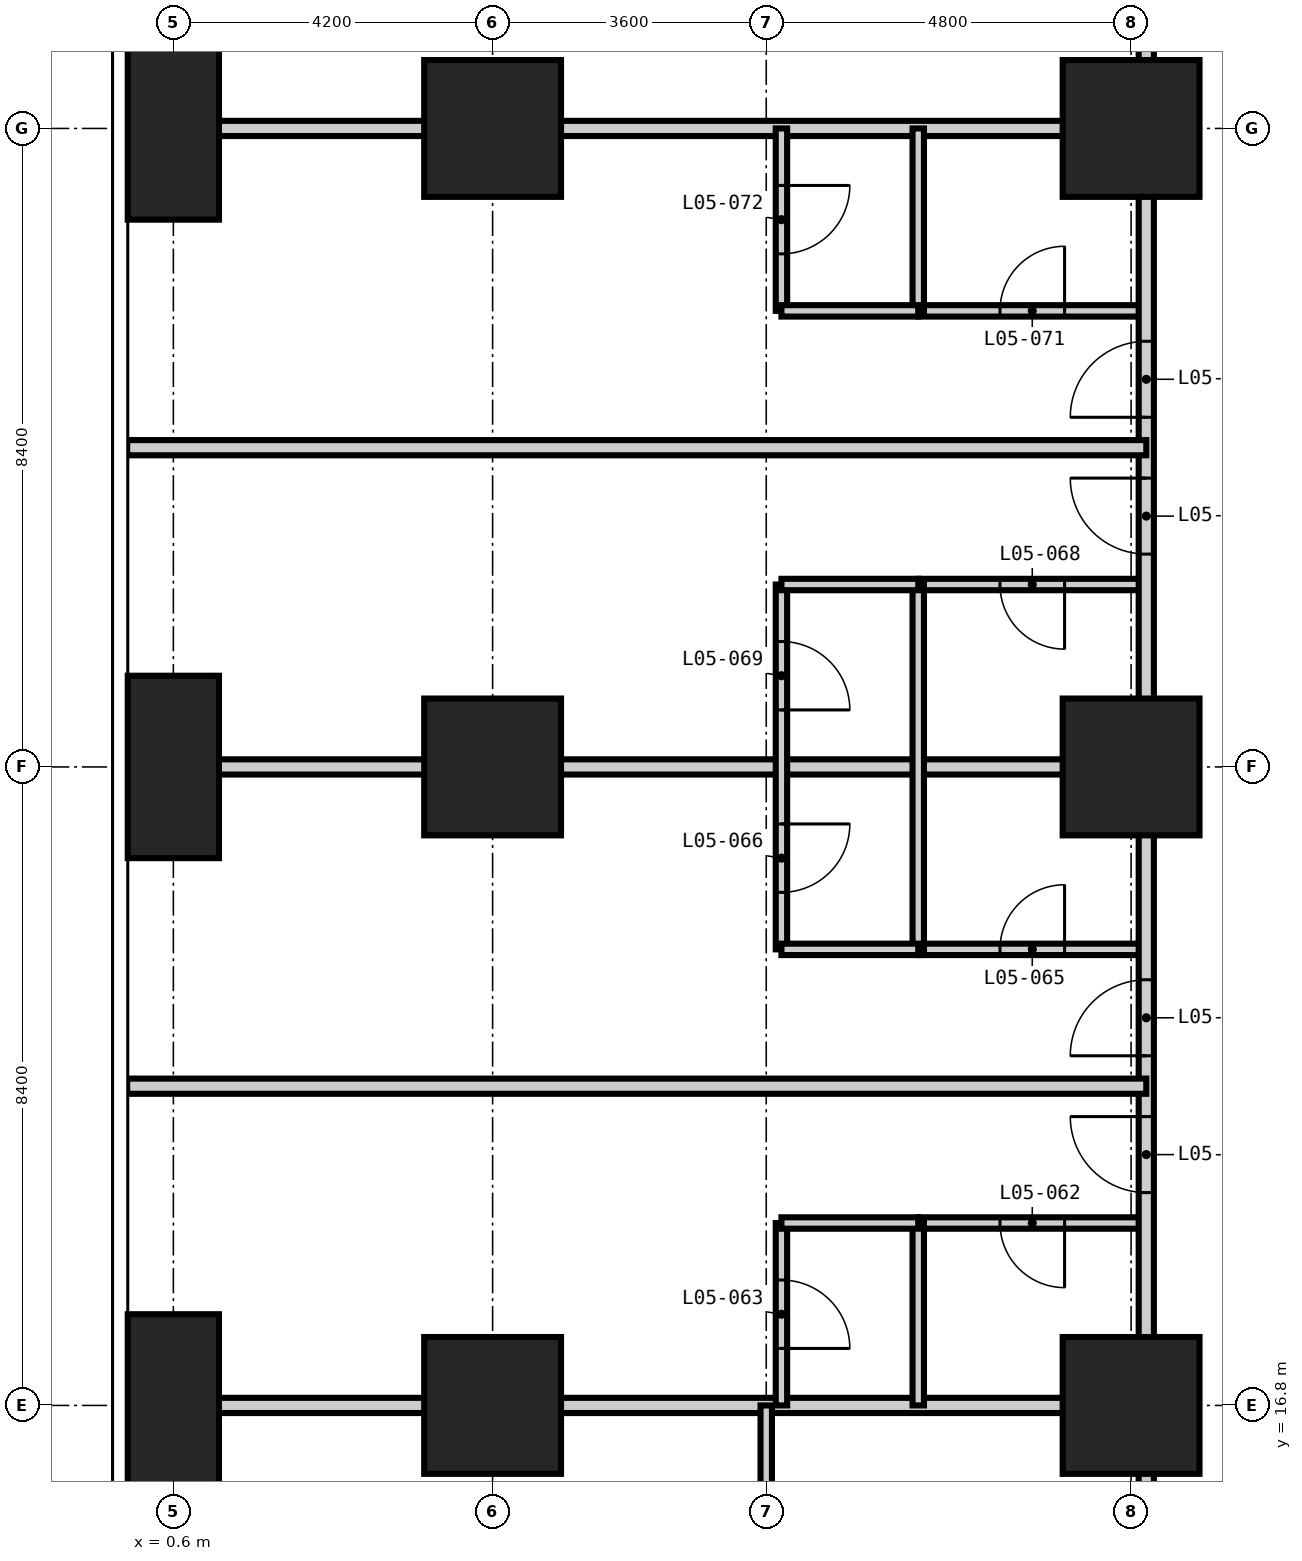
"""IFC4 building model, lengths in metres.
Left out: names, types, materials, properties, quantities, classifications, styles, units other than length and angle.
Written with IfcOpenShell. Run it as: python <this file> out.ifc"""

import sys

from ifc_helpers import new_model, si_unit, direction, frame, frame_2d, origin, origin_2d, place, context, subcontext, project, spatial, rectangle, extrude, element, fill, save


model = new_model("IFC4")
c1 = context("Model", 3, precision=1e-05, world=origin(), true_north=direction((0.0, 1.0)))
c2 = subcontext(c1, "Body", "Model", "MODEL_VIEW")
j1 = project(units=[si_unit("LENGTHUNIT", "METRE"), si_unit("PLANEANGLEUNIT", "RADIAN")], contexts=[c1])
p1 = place(None, origin())
s1 = spatial("IfcSite", under=j1, at=p1, CompositionType="ELEMENT")
p2 = place(p1, origin())
s2 = spatial("IfcBuilding", under=s1, at=p2, CompositionType="ELEMENT")
p3 = place(p2, frame((0.0, 0.0, 27.0)))
s3 = spatial("IfcBuildingStorey", under=s2, at=p3, CompositionType="ELEMENT", Elevation=27.0)
for number, where, z_axis, x_axis in (
    (1, (0.6, 16.8, -0.35), (0.0, 0.0, 1.0), (1.0, 0.0, 0.0)),
    (2, (0.6, 25.2, -0.35), (0.0, 0.0, 1.0), (1.0, 0.0, 0.0)),
    (3, (0.6, 33.6, -0.35), (0.0, 0.0, 1.0), (1.0, 0.0, 0.0)),
):
    element("IfcColumn", number, at=place(p3, frame(where, z_axis=z_axis, x_axis=x_axis)), inside=s3, PredefinedType="COLUMN", context=c2, shape_type="SweptSolid", body=[
        extrude(rectangle(XDim=1.2, YDim=2.4, at=origin_2d()), origin(), (0.0, 0.0, 1.0), 3.6),
    ])
for number, where, z_axis, x_axis in (
    (4, (4.8, 16.8, -0.35), (0.0, 0.0, 1.0), (1.0, 0.0, 0.0)),
    (5, (4.8, 25.2, -0.35), (0.0, 0.0, 1.0), (1.0, 0.0, 0.0)),
    (6, (4.8, 33.6, -0.35), (0.0, 0.0, 1.0), (1.0, 0.0, 0.0)),
    (7, (13.2, 16.8, -0.35), (0.0, 0.0, 1.0), (1.0, 0.0, 0.0)),
    (8, (13.2, 25.2, -0.35), (0.0, 0.0, 1.0), (1.0, 0.0, 0.0)),
    (9, (13.2, 33.6, -0.35), (0.0, 0.0, 1.0), (1.0, 0.0, 0.0)),
):
    element("IfcColumn", number, at=place(p3, frame(where, z_axis=z_axis, x_axis=x_axis)), inside=s3, PredefinedType="COLUMN", context=c2, shape_type="SweptSolid", body=[
        extrude(rectangle(XDim=1.8, YDim=1.8, at=origin_2d()), origin(), (0.0, 0.0, 1.0), 3.6),
    ])
p4 = place(p3, frame((10.4, 19.2, 0.0), z_axis=(0.0, 0.0, 1.0), x_axis=(1.0, 0.0, 0.0)))
e10 = element("IfcWall", 10, at=p4, inside=s3, PredefinedType="PARTITIONING", context=c2, shape_type="SweptSolid", body=[
    extrude(rectangle(XDim=3.0, YDim=0.15, at=frame_2d((1.5, 0.0))), origin(), (0.0, 0.0, 1.0), 3.25),
])
p5 = place(p4, frame((1.075, 0.0, 0.0)))
e11 = element("IfcOpeningElement", 11, at=p5, cuts=e10, PredefinedType="OPENING", context=c2, shape_type="SweptSolid", body=[
    extrude(rectangle(XDim=0.85, YDim=2.1, at=frame_2d((0.425, 1.05))), frame((0.0, 0.085, 0.0), z_axis=(0.0, -1.0, 0.0), x_axis=(1.0, 0.0, 0.0)), (0.0, 0.0, 1.0), 0.17),
])
p6 = place(p3, frame((10.4, 22.8, 0.0), z_axis=(0.0, 0.0, 1.0), x_axis=(1.0, 0.0, 0.0)))
e12 = element("IfcWall", 12, at=p6, inside=s3, PredefinedType="PARTITIONING", context=c2, shape_type="SweptSolid", body=[
    extrude(rectangle(XDim=3.0, YDim=0.15, at=frame_2d((1.5, 0.0))), origin(), (0.0, 0.0, 1.0), 3.25),
])
p7 = place(p6, frame((1.075, 0.0, 0.0)))
e13 = element("IfcOpeningElement", 13, at=p7, cuts=e12, PredefinedType="OPENING", context=c2, shape_type="SweptSolid", body=[
    extrude(rectangle(XDim=0.85, YDim=2.1, at=frame_2d((0.425, 1.05))), frame((0.0, 0.085, 0.0), z_axis=(0.0, -1.0, 0.0), x_axis=(1.0, 0.0, 0.0)), (0.0, 0.0, 1.0), 0.17),
])
p8 = place(p3, frame((10.4, 27.6, 0.0), z_axis=(0.0, 0.0, 1.0), x_axis=(1.0, 0.0, 0.0)))
e14 = element("IfcWall", 14, at=p8, inside=s3, PredefinedType="PARTITIONING", context=c2, shape_type="SweptSolid", body=[
    extrude(rectangle(XDim=3.0, YDim=0.15, at=frame_2d((1.5, 0.0))), origin(), (0.0, 0.0, 1.0), 3.25),
])
p9 = place(p8, frame((1.075, 0.0, 0.0)))
e15 = element("IfcOpeningElement", 15, at=p9, cuts=e14, PredefinedType="OPENING", context=c2, shape_type="SweptSolid", body=[
    extrude(rectangle(XDim=0.85, YDim=2.1, at=frame_2d((0.425, 1.05))), frame((0.0, 0.085, 0.0), z_axis=(0.0, -1.0, 0.0), x_axis=(1.0, 0.0, 0.0)), (0.0, 0.0, 1.0), 0.17),
])
p10 = place(p3, frame((10.4, 31.2, 0.0), z_axis=(0.0, 0.0, 1.0), x_axis=(1.0, 0.0, 0.0)))
e16 = element("IfcWall", 16, at=p10, inside=s3, PredefinedType="PARTITIONING", context=c2, shape_type="SweptSolid", body=[
    extrude(rectangle(XDim=3.0, YDim=0.15, at=frame_2d((1.5, 0.0))), origin(), (0.0, 0.0, 1.0), 3.25),
])
p11 = place(p10, frame((1.075, 0.0, 0.0)))
e17 = element("IfcOpeningElement", 17, at=p11, cuts=e16, PredefinedType="OPENING", context=c2, shape_type="SweptSolid", body=[
    extrude(rectangle(XDim=0.85, YDim=2.1, at=frame_2d((0.425, 1.05))), frame((0.0, 0.085, 0.0), z_axis=(0.0, -1.0, 0.0), x_axis=(1.0, 0.0, 0.0)), (0.0, 0.0, 1.0), 0.17),
])
p12 = place(p3, frame((13.4, 13.4, 0.0), z_axis=(0.0, 0.0, 1.0), x_axis=(0.0, 1.0, 0.0)))
e18 = element("IfcWall", 18, at=p12, inside=s3, PredefinedType="PARTITIONING", context=c2, shape_type="SweptSolid", body=[
    extrude(rectangle(XDim=20.2, YDim=0.2, at=frame_2d((10.1, 0.0))), origin(), (0.0, 0.0, 1.0), 3.25),
])
p13 = place(p12, frame((6.2, 0.0, 0.0)))
e19 = element("IfcOpeningElement", 19, at=p13, cuts=e18, PredefinedType="OPENING", context=c2, shape_type="SweptSolid", body=[
    extrude(rectangle(XDim=1.0, YDim=2.2, at=frame_2d((0.5, 1.1))), frame((0.0, 0.11, 0.0), z_axis=(0.0, -1.0, 0.0), x_axis=(1.0, 0.0, 0.0)), (0.0, 0.0, 1.0), 0.22),
])
p14 = place(p12, frame((8.0, 0.0, 0.0)))
e20 = element("IfcOpeningElement", 20, at=p14, cuts=e18, PredefinedType="OPENING", context=c2, shape_type="SweptSolid", body=[
    extrude(rectangle(XDim=1.0, YDim=2.2, at=frame_2d((0.5, 1.1))), frame((0.0, 0.11, 0.0), z_axis=(0.0, -1.0, 0.0), x_axis=(1.0, 0.0, 0.0)), (0.0, 0.0, 1.0), 0.22),
])
p15 = place(p12, frame((14.6, 0.0, 0.0)))
e21 = element("IfcOpeningElement", 21, at=p15, cuts=e18, PredefinedType="OPENING", context=c2, shape_type="SweptSolid", body=[
    extrude(rectangle(XDim=1.0, YDim=2.2, at=frame_2d((0.5, 1.1))), frame((0.0, 0.11, 0.0), z_axis=(0.0, -1.0, 0.0), x_axis=(1.0, 0.0, 0.0)), (0.0, 0.0, 1.0), 0.22),
])
p16 = place(p12, frame((16.4, 0.0, 0.0)))
e22 = element("IfcOpeningElement", 22, at=p16, cuts=e18, PredefinedType="OPENING", context=c2, shape_type="SweptSolid", body=[
    extrude(rectangle(XDim=1.0, YDim=2.2, at=frame_2d((0.5, 1.1))), frame((0.0, 0.11, 0.0), z_axis=(0.0, -1.0, 0.0), x_axis=(1.0, 0.0, 0.0)), (0.0, 0.0, 1.0), 0.22),
])
p17 = place(p12, frame((1.2, 0.0, 0.0)))
e23 = element("IfcOpeningElement", 23, at=p17, cuts=e18, PredefinedType="OPENING", context=c2, shape_type="SweptSolid", body=[
    extrude(rectangle(XDim=1.0, YDim=2.2, at=frame_2d((0.5, 1.1))), frame((0.0, 0.11, 0.0), z_axis=(0.0, -1.0, 0.0), x_axis=(1.0, 0.0, 0.0)), (0.0, 0.0, 1.0), 0.22),
])
p18 = place(p3, frame((13.4, 42.0, 0.0), z_axis=(0.0, 0.0, 1.0), x_axis=(0.0, -1.0, 0.0)))
e24 = element("IfcWall", 24, at=p18, inside=s3, PredefinedType="PARTITIONING", context=c2, shape_type="SweptSolid", body=[
    extrude(rectangle(XDim=8.4, YDim=0.2, at=frame_2d((4.2, 0.0))), origin(), (0.0, 0.0, 1.0), 3.25),
])
p19 = place(p18, frame((3.3, 0.0, 0.0)))
e25 = element("IfcOpeningElement", 25, at=p19, cuts=e24, PredefinedType="OPENING", context=c2, shape_type="SweptSolid", body=[
    extrude(rectangle(XDim=1.8, YDim=2.4, at=frame_2d((0.9, 1.2))), frame((0.0, 0.11, 0.0), z_axis=(0.0, -1.0, 0.0), x_axis=(1.0, 0.0, 0.0)), (0.0, 0.0, 1.0), 0.22),
])
for number, where, z_axis, x_axis in (
    (26, (-0.008, 16.8, 0.0), (0.0, 0.0, 1.0), (1.0, 0.0, 0.0)),
    (27, (-0.008, 21.0, 0.0), (0.0, 0.0, 1.0), (1.0, 0.0, 0.0)),
    (28, (-0.008, 25.2, 0.0), (0.0, 0.0, 1.0), (1.0, 0.0, 0.0)),
    (29, (-0.008, 29.4, 0.0), (0.0, 0.0, 1.0), (1.0, 0.0, 0.0)),
    (30, (-0.008, 33.6, 0.0), (0.0, 0.0, 1.0), (1.0, 0.0, 0.0)),
):
    element("IfcWall", number, at=place(p3, frame(where, z_axis=z_axis, x_axis=x_axis)), inside=s3, PredefinedType="PARTITIONING", context=c2, shape_type="SweptSolid", body=[
        extrude(rectangle(XDim=13.408, YDim=0.2, at=frame_2d((6.704, 0.0))), origin(), (0.0, 0.0, 1.0), 3.25),
    ])
p20 = place(p3, frame((8.4, -0.008, 0.0), z_axis=(0.0, 0.0, 1.0), x_axis=(0.0, 1.0, 0.0)))
e31 = element("IfcWall", 31, at=p20, inside=s3, PredefinedType="PARTITIONING", context=c2, shape_type="SweptSolid", body=[
    extrude(rectangle(XDim=16.808, YDim=0.15, at=frame_2d((8.404, 0.0))), origin(), (0.0, 0.0, 1.0), 3.25),
])
p21 = place(p20, frame((1.958, 0.0, 0.0)))
e32 = element("IfcOpeningElement", 32, at=p21, cuts=e31, PredefinedType="OPENING", context=c2, shape_type="SweptSolid", body=[
    extrude(rectangle(XDim=0.9, YDim=2.1, at=frame_2d((0.45, 1.05))), frame((0.0, 0.085, 0.0), z_axis=(0.0, -1.0, 0.0), x_axis=(1.0, 0.0, 0.0)), (0.0, 0.0, 1.0), 0.17),
])
p22 = place(p20, frame((12.158, 0.0, 0.0)))
e33 = element("IfcOpeningElement", 33, at=p22, cuts=e31, PredefinedType="OPENING", context=c2, shape_type="SweptSolid", body=[
    extrude(rectangle(XDim=0.9, YDim=2.1, at=frame_2d((0.45, 1.05))), frame((0.0, 0.085, 0.0), z_axis=(0.0, -1.0, 0.0), x_axis=(1.0, 0.0, 0.0)), (0.0, 0.0, 1.0), 0.17),
])
p23 = place(p3, frame((8.6, 16.8, 0.0), z_axis=(0.0, 0.0, 1.0), x_axis=(0.0, 1.0, 0.0)))
e34 = element("IfcWall", 34, at=p23, inside=s3, PredefinedType="PARTITIONING", context=c2, shape_type="SweptSolid", body=[
    extrude(rectangle(XDim=2.4, YDim=0.15, at=frame_2d((1.2, 0.0))), origin(), (0.0, 0.0, 1.0), 3.25),
])
p24 = place(p23, frame((0.75, 0.0, 0.0)))
e35 = element("IfcOpeningElement", 35, at=p24, cuts=e34, PredefinedType="OPENING", context=c2, shape_type="SweptSolid", body=[
    extrude(rectangle(XDim=0.9, YDim=2.1, at=frame_2d((0.45, 1.05))), frame((0.0, 0.085, 0.0), z_axis=(0.0, -1.0, 0.0), x_axis=(1.0, 0.0, 0.0)), (0.0, 0.0, 1.0), 0.17),
])
p25 = place(p3, frame((8.6, 22.8, 0.0), z_axis=(0.0, 0.0, 1.0), x_axis=(0.0, 1.0, 0.0)))
e36 = element("IfcWall", 36, at=p25, inside=s3, PredefinedType="PARTITIONING", context=c2, shape_type="SweptSolid", body=[
    extrude(rectangle(XDim=4.8, YDim=0.15, at=frame_2d((2.4, 0.0))), origin(), (0.0, 0.0, 1.0), 3.25),
])
p26 = place(p25, frame((0.75, 0.0, 0.0)))
e37 = element("IfcOpeningElement", 37, at=p26, cuts=e36, PredefinedType="OPENING", context=c2, shape_type="SweptSolid", body=[
    extrude(rectangle(XDim=0.9, YDim=2.1, at=frame_2d((0.45, 1.05))), frame((0.0, 0.085, 0.0), z_axis=(0.0, -1.0, 0.0), x_axis=(1.0, 0.0, 0.0)), (0.0, 0.0, 1.0), 0.17),
])
p27 = place(p25, frame((3.15, 0.0, 0.0)))
e38 = element("IfcOpeningElement", 38, at=p27, cuts=e36, PredefinedType="OPENING", context=c2, shape_type="SweptSolid", body=[
    extrude(rectangle(XDim=0.9, YDim=2.1, at=frame_2d((0.45, 1.05))), frame((0.0, 0.085, 0.0), z_axis=(0.0, -1.0, 0.0), x_axis=(1.0, 0.0, 0.0)), (0.0, 0.0, 1.0), 0.17),
])
p28 = place(p3, frame((8.6, 31.2, 0.0), z_axis=(0.0, 0.0, 1.0), x_axis=(0.0, 1.0, 0.0)))
e39 = element("IfcWall", 39, at=p28, inside=s3, PredefinedType="PARTITIONING", context=c2, shape_type="SweptSolid", body=[
    extrude(rectangle(XDim=2.4, YDim=0.15, at=frame_2d((1.2, 0.0))), origin(), (0.0, 0.0, 1.0), 3.25),
])
p29 = place(p28, frame((0.75, 0.0, 0.0)))
e40 = element("IfcOpeningElement", 40, at=p29, cuts=e39, PredefinedType="OPENING", context=c2, shape_type="SweptSolid", body=[
    extrude(rectangle(XDim=0.9, YDim=2.1, at=frame_2d((0.45, 1.05))), frame((0.0, 0.085, 0.0), z_axis=(0.0, -1.0, 0.0), x_axis=(1.0, 0.0, 0.0)), (0.0, 0.0, 1.0), 0.17),
])
p30 = place(p3, frame((10.4, 16.8, 0.0), z_axis=(0.0, 0.0, 1.0), x_axis=(0.0, 1.0, 0.0)))
e41 = element("IfcWall", 41, at=p30, inside=s3, PredefinedType="PARTITIONING", context=c2, shape_type="SweptSolid", body=[
    extrude(rectangle(XDim=2.4, YDim=0.15, at=frame_2d((1.2, 0.0))), origin(), (0.0, 0.0, 1.0), 3.25),
])
p31 = place(p3, frame((10.4, 22.8, 0.0), z_axis=(0.0, 0.0, 1.0), x_axis=(0.0, 1.0, 0.0)))
e42 = element("IfcWall", 42, at=p31, inside=s3, PredefinedType="PARTITIONING", context=c2, shape_type="SweptSolid", body=[
    extrude(rectangle(XDim=4.8, YDim=0.15, at=frame_2d((2.4, 0.0))), origin(), (0.0, 0.0, 1.0), 3.25),
])
p32 = place(p3, frame((10.4, 31.2, 0.0), z_axis=(0.0, 0.0, 1.0), x_axis=(0.0, 1.0, 0.0)))
e43 = element("IfcWall", 43, at=p32, inside=s3, PredefinedType="PARTITIONING", context=c2, shape_type="SweptSolid", body=[
    extrude(rectangle(XDim=2.4, YDim=0.15, at=frame_2d((1.2, 0.0))), origin(), (0.0, 0.0, 1.0), 3.25),
])
for number, where, z_axis, x_axis in (
    (44, (8.6, 19.2, 0.0), (0.0, 0.0, 1.0), (1.0, 0.0, 0.0)),
    (45, (8.6, 22.8, 0.0), (0.0, 0.0, 1.0), (1.0, 0.0, 0.0)),
    (46, (8.6, 27.6, 0.0), (0.0, 0.0, 1.0), (1.0, 0.0, 0.0)),
    (47, (8.6, 31.2, 0.0), (0.0, 0.0, 1.0), (1.0, 0.0, 0.0)),
):
    element("IfcWall", number, at=place(p3, frame(where, z_axis=z_axis, x_axis=x_axis)), inside=s3, PredefinedType="PARTITIONING", context=c2, shape_type="SweptSolid", body=[
        extrude(rectangle(XDim=1.8, YDim=0.15, at=frame_2d((0.9, 0.0))), origin(), (0.0, 0.0, 1.0), 3.25),
    ])
p33 = place(p13, origin())
e48 = element("IfcDoor", 48, at=p33, inside=s3, OperationType="SINGLE_SWING_RIGHT", PredefinedType="DOOR", context=c2, shape_type="SweptSolid", body=[
    extrude(rectangle(XDim=1.0, YDim=2.2, at=frame_2d((0.5, 1.1))), frame((0.0, 0.025, 0.0), z_axis=(0.0, -1.0, 0.0), x_axis=(1.0, 0.0, 0.0)), (0.0, 0.0, 1.0), 0.05),
])
fill(e19, e48)
p34 = place(p5, frame((0.85, 0.0, 0.0), z_axis=(0.0, 0.0, 1.0), x_axis=(-1.0, 0.0, 0.0)))
e49 = element("IfcDoor", 49, at=p34, inside=s3, OperationType="SINGLE_SWING_LEFT", PredefinedType="DOOR", context=c2, shape_type="SweptSolid", body=[
    extrude(rectangle(XDim=0.85, YDim=2.1, at=frame_2d((0.425, 1.05))), frame((0.0, 0.025, 0.0), z_axis=(0.0, -1.0, 0.0), x_axis=(1.0, 0.0, 0.0)), (0.0, 0.0, 1.0), 0.05),
])
fill(e11, e49)
p35 = place(p24, frame((0.9, 0.0, 0.0), z_axis=(0.0, 0.0, 1.0), x_axis=(-1.0, 0.0, 0.0)))
e50 = element("IfcDoor", 50, at=p35, inside=s3, OperationType="SINGLE_SWING_RIGHT", PredefinedType="DOOR", context=c2, shape_type="SweptSolid", body=[
    extrude(rectangle(XDim=0.9, YDim=2.1, at=frame_2d((0.45, 1.05))), frame((0.0, 0.025, 0.0), z_axis=(0.0, -1.0, 0.0), x_axis=(1.0, 0.0, 0.0)), (0.0, 0.0, 1.0), 0.05),
])
fill(e35, e50)
p36 = place(p14, origin())
e51 = element("IfcDoor", 51, at=p36, inside=s3, OperationType="SINGLE_SWING_LEFT", PredefinedType="DOOR", context=c2, shape_type="SweptSolid", body=[
    extrude(rectangle(XDim=1.0, YDim=2.2, at=frame_2d((0.5, 1.1))), frame((0.0, 0.025, 0.0), z_axis=(0.0, -1.0, 0.0), x_axis=(1.0, 0.0, 0.0)), (0.0, 0.0, 1.0), 0.05),
])
fill(e20, e51)
p37 = place(p7, origin())
e52 = element("IfcDoor", 52, at=p37, inside=s3, OperationType="SINGLE_SWING_RIGHT", PredefinedType="DOOR", context=c2, shape_type="SweptSolid", body=[
    extrude(rectangle(XDim=0.85, YDim=2.1, at=frame_2d((0.425, 1.05))), frame((0.0, 0.025, 0.0), z_axis=(0.0, -1.0, 0.0), x_axis=(1.0, 0.0, 0.0)), (0.0, 0.0, 1.0), 0.05),
])
fill(e13, e52)
p38 = place(p26, frame((0.9, 0.0, 0.0), z_axis=(0.0, 0.0, 1.0), x_axis=(-1.0, 0.0, 0.0)))
e53 = element("IfcDoor", 53, at=p38, inside=s3, OperationType="SINGLE_SWING_LEFT", PredefinedType="DOOR", context=c2, shape_type="SweptSolid", body=[
    extrude(rectangle(XDim=0.9, YDim=2.1, at=frame_2d((0.45, 1.05))), frame((0.0, 0.025, 0.0), z_axis=(0.0, -1.0, 0.0), x_axis=(1.0, 0.0, 0.0)), (0.0, 0.0, 1.0), 0.05),
])
fill(e37, e53)
p39 = place(p15, origin())
e54 = element("IfcDoor", 54, at=p39, inside=s3, OperationType="SINGLE_SWING_RIGHT", PredefinedType="DOOR", context=c2, shape_type="SweptSolid", body=[
    extrude(rectangle(XDim=1.0, YDim=2.2, at=frame_2d((0.5, 1.1))), frame((0.0, 0.025, 0.0), z_axis=(0.0, -1.0, 0.0), x_axis=(1.0, 0.0, 0.0)), (0.0, 0.0, 1.0), 0.05),
])
fill(e21, e54)
p40 = place(p9, frame((0.85, 0.0, 0.0), z_axis=(0.0, 0.0, 1.0), x_axis=(-1.0, 0.0, 0.0)))
e55 = element("IfcDoor", 55, at=p40, inside=s3, OperationType="SINGLE_SWING_LEFT", PredefinedType="DOOR", context=c2, shape_type="SweptSolid", body=[
    extrude(rectangle(XDim=0.85, YDim=2.1, at=frame_2d((0.425, 1.05))), frame((0.0, 0.025, 0.0), z_axis=(0.0, -1.0, 0.0), x_axis=(1.0, 0.0, 0.0)), (0.0, 0.0, 1.0), 0.05),
])
fill(e15, e55)
p41 = place(p27, frame((0.9, 0.0, 0.0), z_axis=(0.0, 0.0, 1.0), x_axis=(-1.0, 0.0, 0.0)))
e56 = element("IfcDoor", 56, at=p41, inside=s3, OperationType="SINGLE_SWING_RIGHT", PredefinedType="DOOR", context=c2, shape_type="SweptSolid", body=[
    extrude(rectangle(XDim=0.9, YDim=2.1, at=frame_2d((0.45, 1.05))), frame((0.0, 0.025, 0.0), z_axis=(0.0, -1.0, 0.0), x_axis=(1.0, 0.0, 0.0)), (0.0, 0.0, 1.0), 0.05),
])
fill(e38, e56)
p42 = place(p16, origin())
e57 = element("IfcDoor", 57, at=p42, inside=s3, OperationType="SINGLE_SWING_LEFT", PredefinedType="DOOR", context=c2, shape_type="SweptSolid", body=[
    extrude(rectangle(XDim=1.0, YDim=2.2, at=frame_2d((0.5, 1.1))), frame((0.0, 0.025, 0.0), z_axis=(0.0, -1.0, 0.0), x_axis=(1.0, 0.0, 0.0)), (0.0, 0.0, 1.0), 0.05),
])
fill(e22, e57)
p43 = place(p11, origin())
e58 = element("IfcDoor", 58, at=p43, inside=s3, OperationType="SINGLE_SWING_RIGHT", PredefinedType="DOOR", context=c2, shape_type="SweptSolid", body=[
    extrude(rectangle(XDim=0.85, YDim=2.1, at=frame_2d((0.425, 1.05))), frame((0.0, 0.025, 0.0), z_axis=(0.0, -1.0, 0.0), x_axis=(1.0, 0.0, 0.0)), (0.0, 0.0, 1.0), 0.05),
])
fill(e17, e58)
p44 = place(p29, frame((0.9, 0.0, 0.0), z_axis=(0.0, 0.0, 1.0), x_axis=(-1.0, 0.0, 0.0)))
e59 = element("IfcDoor", 59, at=p44, inside=s3, OperationType="SINGLE_SWING_LEFT", PredefinedType="DOOR", context=c2, shape_type="SweptSolid", body=[
    extrude(rectangle(XDim=0.9, YDim=2.1, at=frame_2d((0.45, 1.05))), frame((0.0, 0.025, 0.0), z_axis=(0.0, -1.0, 0.0), x_axis=(1.0, 0.0, 0.0)), (0.0, 0.0, 1.0), 0.05),
])
fill(e40, e59)
save(model, sys.argv[1])
